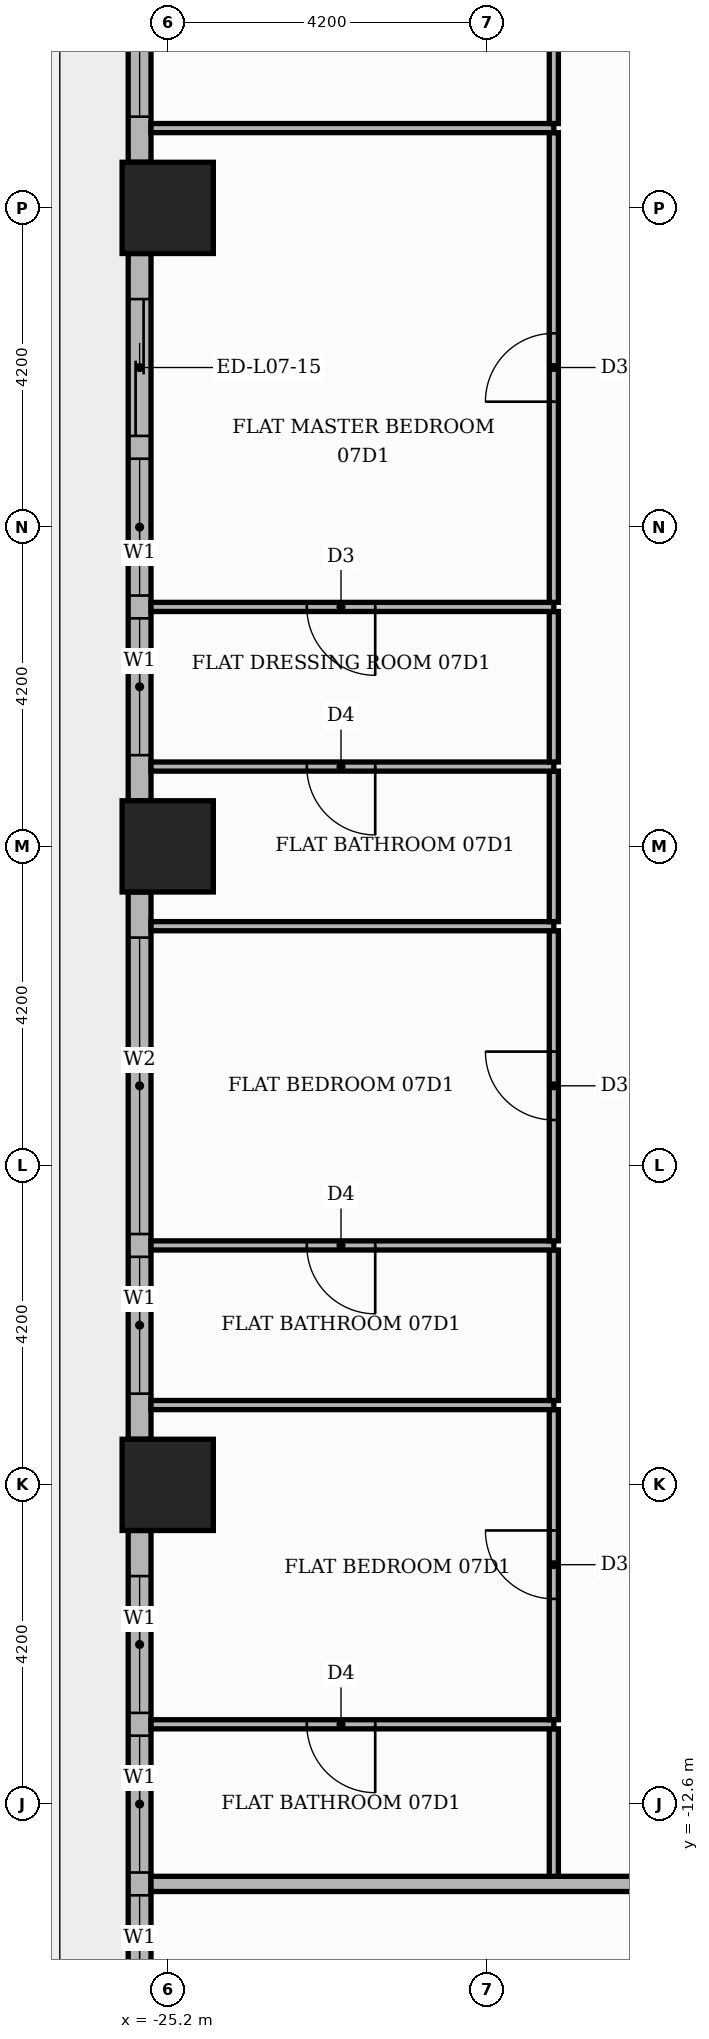
"""IFC4 building model, lengths in metres.
Left out: names, types, materials, properties, quantities, classifications, styles, units other than length and angle.
Written with IfcOpenShell. Run it as: python <this file> out.ifc"""

import sys

from ifc_helpers import new_model, si_unit, direction, frame, frame_2d, origin, origin_2d, place, context, subcontext, project, spatial, rectangle, extrude, element, fill, save


model = new_model("IFC4")
c1 = context("Model", 3, precision=1e-05, world=origin(), true_north=direction((0.0, 1.0)))
c2 = subcontext(c1, "Body", "Model", "MODEL_VIEW")
j1 = project(units=[si_unit("LENGTHUNIT", "METRE"), si_unit("PLANEANGLEUNIT", "RADIAN")], contexts=[c1])
p1 = place(None, origin())
s1 = spatial("IfcSite", under=j1, at=p1, CompositionType="ELEMENT")
p2 = place(p1, origin())
s2 = spatial("IfcBuilding", under=s1, at=p2, CompositionType="ELEMENT")
p3 = place(p2, frame((0.0, 0.0, 34.8)))
s3 = spatial("IfcBuildingStorey", under=s2, at=p3, CompositionType="ELEMENT", Elevation=34.8)
for number, where, z_axis, x_axis in (
    (1, (-25.2, 0.0, 0.0), (0.0, 0.0, 1.0), (1.0, 0.0, 0.0)),
    (2, (-25.2, -8.4, 0.0), (0.0, 0.0, 1.0), (1.0, 0.0, 0.0)),
    (3, (-25.2, 8.4, 0.0), (0.0, 0.0, 1.0), (1.0, 0.0, 0.0)),
):
    element("IfcColumn", number, at=place(p3, frame(where, z_axis=z_axis, x_axis=x_axis)), inside=s3, PredefinedType="COLUMN", context=c2, shape_type="SweptSolid", body=[
        extrude(rectangle(XDim=1.2, YDim=1.2, at=origin_2d()), origin(), (0.0, 0.0, 1.0), 3.9),
    ])
p4 = place(p3, frame((-25.57, 16.2, 0.0), z_axis=(0.0, 0.0, 1.0), x_axis=(0.0, -1.0, 0.0)))
e4 = element("IfcWall", 4, at=p4, inside=s3, PredefinedType="STANDARD", context=c2, shape_type="SweptSolid", body=[
    extrude(rectangle(XDim=7.2, YDim=0.3, at=frame_2d((3.6, 0.0))), origin(), (0.0, 0.0, 1.0), 3.48),
])
p5 = place(p4, frame((0.6, 0.0, 0.0)))
e5 = element("IfcOpeningElement", 5, at=p5, cuts=e4, PredefinedType="OPENING", context=c2, shape_type="SweptSolid", body=[
    extrude(rectangle(XDim=1.8, YDim=2.4, at=frame_2d((0.9, 1.2))), frame((0.0, 0.16, 0.0), z_axis=(0.0, -1.0, 0.0), x_axis=(1.0, 0.0, 0.0)), (0.0, 0.0, 1.0), 0.32),
])
p6 = place(p4, frame((2.7, 0.0, 0.9)))
e6 = element("IfcOpeningElement", 6, at=p6, cuts=e4, PredefinedType="OPENING", context=c2, shape_type="SweptSolid", body=[
    extrude(rectangle(XDim=3.9, YDim=2.1, at=frame_2d((1.95, 1.05))), frame((0.0, 0.16, 0.0), z_axis=(0.0, -1.0, 0.0), x_axis=(1.0, 0.0, 0.0)), (0.0, 0.0, 1.0), 0.32),
])
p7 = place(p3, frame((-25.57, 7.8, 0.0), z_axis=(0.0, 0.0, 1.0), x_axis=(0.0, -1.0, 0.0)))
e7 = element("IfcWall", 7, at=p7, inside=s3, PredefinedType="STANDARD", context=c2, shape_type="SweptSolid", body=[
    extrude(rectangle(XDim=7.2, YDim=0.3, at=frame_2d((3.6, 0.0))), origin(), (0.0, 0.0, 1.0), 3.48),
])
p8 = place(p7, frame((0.6, 0.0, 0.0)))
e8 = element("IfcOpeningElement", 8, at=p8, cuts=e7, PredefinedType="OPENING", context=c2, shape_type="SweptSolid", body=[
    extrude(rectangle(XDim=1.8, YDim=2.4, at=frame_2d((0.9, 1.2))), frame((0.0, 0.16, 0.0), z_axis=(0.0, -1.0, 0.0), x_axis=(1.0, 0.0, 0.0)), (0.0, 0.0, 1.0), 0.32),
])
p9 = place(p7, frame((2.7, 0.0, 0.9)))
e9 = element("IfcOpeningElement", 9, at=p9, cuts=e7, PredefinedType="OPENING", context=c2, shape_type="SweptSolid", body=[
    extrude(rectangle(XDim=1.8, YDim=2.1, at=frame_2d((0.9, 1.05))), frame((0.0, 0.16, 0.0), z_axis=(0.0, -1.0, 0.0), x_axis=(1.0, 0.0, 0.0)), (0.0, 0.0, 1.0), 0.32),
])
p10 = place(p7, frame((4.8, 0.0, 0.9)))
e10 = element("IfcOpeningElement", 10, at=p10, cuts=e7, PredefinedType="OPENING", context=c2, shape_type="SweptSolid", body=[
    extrude(rectangle(XDim=1.8, YDim=2.1, at=frame_2d((0.9, 1.05))), frame((0.0, 0.16, 0.0), z_axis=(0.0, -1.0, 0.0), x_axis=(1.0, 0.0, 0.0)), (0.0, 0.0, 1.0), 0.32),
])
p11 = place(p3, frame((-25.57, -0.6, 0.0), z_axis=(0.0, 0.0, 1.0), x_axis=(0.0, -1.0, 0.0)))
e11 = element("IfcWall", 11, at=p11, inside=s3, PredefinedType="STANDARD", context=c2, shape_type="SweptSolid", body=[
    extrude(rectangle(XDim=7.2, YDim=0.3, at=frame_2d((3.6, 0.0))), origin(), (0.0, 0.0, 1.0), 3.48),
])
p12 = place(p11, frame((0.6, 0.0, 0.9)))
e12 = element("IfcOpeningElement", 12, at=p12, cuts=e11, PredefinedType="OPENING", context=c2, shape_type="SweptSolid", body=[
    extrude(rectangle(XDim=3.9, YDim=2.1, at=frame_2d((1.95, 1.05))), frame((0.0, 0.16, 0.0), z_axis=(0.0, -1.0, 0.0), x_axis=(1.0, 0.0, 0.0)), (0.0, 0.0, 1.0), 0.32),
])
p13 = place(p11, frame((4.8, 0.0, 0.9)))
e13 = element("IfcOpeningElement", 13, at=p13, cuts=e11, PredefinedType="OPENING", context=c2, shape_type="SweptSolid", body=[
    extrude(rectangle(XDim=1.8, YDim=2.1, at=frame_2d((0.9, 1.05))), frame((0.0, 0.16, 0.0), z_axis=(0.0, -1.0, 0.0), x_axis=(1.0, 0.0, 0.0)), (0.0, 0.0, 1.0), 0.32),
])
p14 = place(p3, frame((-25.57, -9.0, 0.0), z_axis=(0.0, 0.0, 1.0), x_axis=(0.0, -1.0, 0.0)))
e14 = element("IfcWall", 14, at=p14, inside=s3, PredefinedType="STANDARD", context=c2, shape_type="SweptSolid", body=[
    extrude(rectangle(XDim=7.2, YDim=0.3, at=frame_2d((3.6, 0.0))), origin(), (0.0, 0.0, 1.0), 3.48),
])
p15 = place(p14, frame((0.6, 0.0, 0.9)))
e15 = element("IfcOpeningElement", 15, at=p15, cuts=e14, PredefinedType="OPENING", context=c2, shape_type="SweptSolid", body=[
    extrude(rectangle(XDim=1.8, YDim=2.1, at=frame_2d((0.9, 1.05))), frame((0.0, 0.16, 0.0), z_axis=(0.0, -1.0, 0.0), x_axis=(1.0, 0.0, 0.0)), (0.0, 0.0, 1.0), 0.32),
])
p16 = place(p14, frame((2.7, 0.0, 0.9)))
e16 = element("IfcOpeningElement", 16, at=p16, cuts=e14, PredefinedType="OPENING", context=c2, shape_type="SweptSolid", body=[
    extrude(rectangle(XDim=1.8, YDim=2.1, at=frame_2d((0.9, 1.05))), frame((0.0, 0.16, 0.0), z_axis=(0.0, -1.0, 0.0), x_axis=(1.0, 0.0, 0.0)), (0.0, 0.0, 1.0), 0.32),
])
p17 = place(p14, frame((4.8, 0.0, 0.9)))
e17 = element("IfcOpeningElement", 17, at=p17, cuts=e14, PredefinedType="OPENING", context=c2, shape_type="SweptSolid", body=[
    extrude(rectangle(XDim=1.8, YDim=2.1, at=frame_2d((0.9, 1.05))), frame((0.0, 0.16, 0.0), z_axis=(0.0, -1.0, 0.0), x_axis=(1.0, 0.0, 0.0)), (0.0, 0.0, 1.0), 0.32),
])
p18 = place(p3, frame((-25.42, -13.65, 0.0), z_axis=(0.0, 0.0, 1.0), x_axis=(1.0, 0.0, 0.0)))
e18 = element("IfcWall", 18, at=p18, inside=s3, PredefinedType="PARTITIONING", context=c2, shape_type="SweptSolid", body=[
    extrude(rectangle(XDim=39.07, YDim=0.2, at=frame_2d((19.535, 0.0))), origin(), (0.0, 0.0, 1.0), 3.48),
])
p19 = place(p18, frame((14.37, 0.0, 0.0)))
e19 = element("IfcOpeningElement", 19, at=p19, cuts=e18, PredefinedType="OPENING", context=c2, shape_type="SweptSolid", body=[
    extrude(rectangle(XDim=1.1, YDim=2.4, at=frame_2d((0.55, 1.2))), frame((0.0, 0.11, 0.0), z_axis=(0.0, -1.0, 0.0), x_axis=(1.0, 0.0, 0.0)), (0.0, 0.0, 1.0), 0.22),
])
p20 = place(p3, frame((-20.12, -13.55, 0.0), z_axis=(0.0, 0.0, 1.0), x_axis=(0.0, 1.0, 0.0)))
e20 = element("IfcWall", 20, at=p20, inside=s3, PredefinedType="PARTITIONING", context=c2, shape_type="SweptSolid", body=[
    extrude(rectangle(XDim=1.94, YDim=0.12, at=frame_2d((0.97, 0.0))), origin(), (0.0, 0.0, 1.0), 3.48),
])
p21 = place(p3, frame((-25.42, -11.55, 0.0), z_axis=(0.0, 0.0, 1.0), x_axis=(1.0, 0.0, 0.0)))
e21 = element("IfcWall", 21, at=p21, inside=s3, PredefinedType="PARTITIONING", context=c2, shape_type="SweptSolid", body=[
    extrude(rectangle(XDim=5.3, YDim=0.12, at=frame_2d((2.65, 0.0))), origin(), (0.0, 0.0, 1.0), 3.48),
])
p22 = place(p21, frame((2.05, 0.0, 0.0)))
e22 = element("IfcOpeningElement", 22, at=p22, cuts=e21, PredefinedType="OPENING", context=c2, shape_type="SweptSolid", body=[
    extrude(rectangle(XDim=0.9, YDim=2.1, at=frame_2d((0.45, 1.05))), frame((0.0, 0.07, 0.0), z_axis=(0.0, -1.0, 0.0), x_axis=(1.0, 0.0, 0.0)), (0.0, 0.0, 1.0), 0.14),
])
p23 = place(p3, frame((-20.12, -11.49, 0.0), z_axis=(0.0, 0.0, 1.0), x_axis=(0.0, 1.0, 0.0)))
e23 = element("IfcWall", 23, at=p23, inside=s3, PredefinedType="PARTITIONING", context=c2, shape_type="SweptSolid", body=[
    extrude(rectangle(XDim=4.08, YDim=0.12, at=frame_2d((2.04, 0.0))), origin(), (0.0, 0.0, 1.0), 3.48),
])
p24 = place(p23, frame((1.59, 0.0, 0.0)))
e24 = element("IfcOpeningElement", 24, at=p24, cuts=e23, PredefinedType="OPENING", context=c2, shape_type="SweptSolid", body=[
    extrude(rectangle(XDim=0.9, YDim=2.1, at=frame_2d((0.45, 1.05))), frame((0.0, 0.07, 0.0), z_axis=(0.0, -1.0, 0.0), x_axis=(1.0, 0.0, 0.0)), (0.0, 0.0, 1.0), 0.14),
])
p25 = place(p3, frame((-25.42, -7.35, 0.0), z_axis=(0.0, 0.0, 1.0), x_axis=(1.0, 0.0, 0.0)))
e25 = element("IfcWall", 25, at=p25, inside=s3, PredefinedType="PARTITIONING", context=c2, shape_type="SweptSolid", body=[
    extrude(rectangle(XDim=5.3, YDim=0.12, at=frame_2d((2.65, 0.0))), origin(), (0.0, 0.0, 1.0), 3.48),
])
p26 = place(p3, frame((-20.12, -7.29, 0.0), z_axis=(0.0, 0.0, 1.0), x_axis=(0.0, 1.0, 0.0)))
e26 = element("IfcWall", 26, at=p26, inside=s3, PredefinedType="PARTITIONING", context=c2, shape_type="SweptSolid", body=[
    extrude(rectangle(XDim=1.98, YDim=0.12, at=frame_2d((0.99, 0.0))), origin(), (0.0, 0.0, 1.0), 3.48),
])
p27 = place(p3, frame((-25.42, -5.25, 0.0), z_axis=(0.0, 0.0, 1.0), x_axis=(1.0, 0.0, 0.0)))
e27 = element("IfcWall", 27, at=p27, inside=s3, PredefinedType="PARTITIONING", context=c2, shape_type="SweptSolid", body=[
    extrude(rectangle(XDim=5.3, YDim=0.12, at=frame_2d((2.65, 0.0))), origin(), (0.0, 0.0, 1.0), 3.48),
])
p28 = place(p27, frame((2.05, 0.0, 0.0)))
e28 = element("IfcOpeningElement", 28, at=p28, cuts=e27, PredefinedType="OPENING", context=c2, shape_type="SweptSolid", body=[
    extrude(rectangle(XDim=0.9, YDim=2.1, at=frame_2d((0.45, 1.05))), frame((0.0, 0.07, 0.0), z_axis=(0.0, -1.0, 0.0), x_axis=(1.0, 0.0, 0.0)), (0.0, 0.0, 1.0), 0.14),
])
p29 = place(p3, frame((-20.12, -5.19, 0.0), z_axis=(0.0, 0.0, 1.0), x_axis=(0.0, 1.0, 0.0)))
e29 = element("IfcWall", 29, at=p29, inside=s3, PredefinedType="PARTITIONING", context=c2, shape_type="SweptSolid", body=[
    extrude(rectangle(XDim=4.08, YDim=0.12, at=frame_2d((2.04, 0.0))), origin(), (0.0, 0.0, 1.0), 3.48),
])
p30 = place(p29, frame((1.59, 0.0, 0.0)))
e30 = element("IfcOpeningElement", 30, at=p30, cuts=e29, PredefinedType="OPENING", context=c2, shape_type="SweptSolid", body=[
    extrude(rectangle(XDim=0.9, YDim=2.1, at=frame_2d((0.45, 1.05))), frame((0.0, 0.07, 0.0), z_axis=(0.0, -1.0, 0.0), x_axis=(1.0, 0.0, 0.0)), (0.0, 0.0, 1.0), 0.14),
])
p31 = place(p3, frame((-25.42, -1.05, 0.0), z_axis=(0.0, 0.0, 1.0), x_axis=(1.0, 0.0, 0.0)))
e31 = element("IfcWall", 31, at=p31, inside=s3, PredefinedType="PARTITIONING", context=c2, shape_type="SweptSolid", body=[
    extrude(rectangle(XDim=5.3, YDim=0.12, at=frame_2d((2.65, 0.0))), origin(), (0.0, 0.0, 1.0), 3.48),
])
p32 = place(p3, frame((-20.12, -0.99, 0.0), z_axis=(0.0, 0.0, 1.0), x_axis=(0.0, 1.0, 0.0)))
e32 = element("IfcWall", 32, at=p32, inside=s3, PredefinedType="PARTITIONING", context=c2, shape_type="SweptSolid", body=[
    extrude(rectangle(XDim=1.98, YDim=0.12, at=frame_2d((0.99, 0.0))), origin(), (0.0, 0.0, 1.0), 3.48),
])
p33 = place(p3, frame((-25.42, 1.05, 0.0), z_axis=(0.0, 0.0, 1.0), x_axis=(1.0, 0.0, 0.0)))
e33 = element("IfcWall", 33, at=p33, inside=s3, PredefinedType="PARTITIONING", context=c2, shape_type="SweptSolid", body=[
    extrude(rectangle(XDim=5.3, YDim=0.12, at=frame_2d((2.65, 0.0))), origin(), (0.0, 0.0, 1.0), 3.48),
])
p34 = place(p33, frame((2.05, 0.0, 0.0)))
e34 = element("IfcOpeningElement", 34, at=p34, cuts=e33, PredefinedType="OPENING", context=c2, shape_type="SweptSolid", body=[
    extrude(rectangle(XDim=0.9, YDim=2.1, at=frame_2d((0.45, 1.05))), frame((0.0, 0.07, 0.0), z_axis=(0.0, -1.0, 0.0), x_axis=(1.0, 0.0, 0.0)), (0.0, 0.0, 1.0), 0.14),
])
p35 = place(p3, frame((-20.12, 1.11, 0.0), z_axis=(0.0, 0.0, 1.0), x_axis=(0.0, 1.0, 0.0)))
e35 = element("IfcWall", 35, at=p35, inside=s3, PredefinedType="PARTITIONING", context=c2, shape_type="SweptSolid", body=[
    extrude(rectangle(XDim=1.98, YDim=0.12, at=frame_2d((0.99, 0.0))), origin(), (0.0, 0.0, 1.0), 3.48),
])
p36 = place(p3, frame((-25.42, 3.15, 0.0), z_axis=(0.0, 0.0, 1.0), x_axis=(1.0, 0.0, 0.0)))
e36 = element("IfcWall", 36, at=p36, inside=s3, PredefinedType="PARTITIONING", context=c2, shape_type="SweptSolid", body=[
    extrude(rectangle(XDim=5.3, YDim=0.12, at=frame_2d((2.65, 0.0))), origin(), (0.0, 0.0, 1.0), 3.48),
])
p37 = place(p36, frame((2.05, 0.0, 0.0)))
e37 = element("IfcOpeningElement", 37, at=p37, cuts=e36, PredefinedType="OPENING", context=c2, shape_type="SweptSolid", body=[
    extrude(rectangle(XDim=0.9, YDim=2.1, at=frame_2d((0.45, 1.05))), frame((0.0, 0.07, 0.0), z_axis=(0.0, -1.0, 0.0), x_axis=(1.0, 0.0, 0.0)), (0.0, 0.0, 1.0), 0.14),
])
p38 = place(p3, frame((-20.12, 3.21, 0.0), z_axis=(0.0, 0.0, 1.0), x_axis=(0.0, 1.0, 0.0)))
e38 = element("IfcWall", 38, at=p38, inside=s3, PredefinedType="PARTITIONING", context=c2, shape_type="SweptSolid", body=[
    extrude(rectangle(XDim=6.18, YDim=0.12, at=frame_2d((3.09, 0.0))), origin(), (0.0, 0.0, 1.0), 3.48),
])
p39 = place(p38, frame((2.64, 0.0, 0.0)))
e39 = element("IfcOpeningElement", 39, at=p39, cuts=e38, PredefinedType="OPENING", context=c2, shape_type="SweptSolid", body=[
    extrude(rectangle(XDim=0.9, YDim=2.1, at=frame_2d((0.45, 1.05))), frame((0.0, 0.07, 0.0), z_axis=(0.0, -1.0, 0.0), x_axis=(1.0, 0.0, 0.0)), (0.0, 0.0, 1.0), 0.14),
])
p40 = place(p3, frame((-25.42, 9.45, 0.0), z_axis=(0.0, 0.0, 1.0), x_axis=(1.0, 0.0, 0.0)))
e40 = element("IfcWall", 40, at=p40, inside=s3, PredefinedType="PARTITIONING", context=c2, shape_type="SweptSolid", body=[
    extrude(rectangle(XDim=5.3, YDim=0.12, at=frame_2d((2.65, 0.0))), origin(), (0.0, 0.0, 1.0), 3.48),
])
p41 = place(p3, frame((-20.12, 9.51, 0.0), z_axis=(0.0, 0.0, 1.0), x_axis=(0.0, 1.0, 0.0)))
e41 = element("IfcWall", 41, at=p41, inside=s3, PredefinedType="PARTITIONING", context=c2, shape_type="SweptSolid", body=[
    extrude(rectangle(XDim=4.08, YDim=0.12, at=frame_2d((2.04, 0.0))), origin(), (0.0, 0.0, 1.0), 3.48),
])
p42 = place(p41, frame((1.59, 0.0, 0.0)))
e42 = element("IfcOpeningElement", 42, at=p42, cuts=e41, PredefinedType="OPENING", context=c2, shape_type="SweptSolid", body=[
    extrude(rectangle(XDim=0.9, YDim=2.1, at=frame_2d((0.45, 1.05))), frame((0.0, 0.07, 0.0), z_axis=(0.0, -1.0, 0.0), x_axis=(1.0, 0.0, 0.0)), (0.0, 0.0, 1.0), 0.14),
])
p43 = place(p6, origin())
e43 = element("IfcWindow", 43, at=p43, inside=s3, PartitioningType="SINGLE_PANEL", PredefinedType="WINDOW", context=c2, shape_type="SweptSolid", body=[
    extrude(rectangle(XDim=3.9, YDim=2.1, at=frame_2d((1.95, 1.05))), frame((0.0, 0.03, 0.0), z_axis=(0.0, -1.0, 0.0), x_axis=(1.0, 0.0, 0.0)), (0.0, 0.0, 1.0), 0.06),
])
fill(e6, e43)
p44 = place(p8, origin())
e44 = element("IfcDoor", 44, at=p44, inside=s3, OperationType="SLIDING_TO_LEFT", PredefinedType="DOOR", context=c2, shape_type="SweptSolid", body=[
    extrude(rectangle(XDim=1.8, YDim=2.4, at=frame_2d((0.9, 1.2))), frame((0.0, 0.025, 0.0), z_axis=(0.0, -1.0, 0.0), x_axis=(1.0, 0.0, 0.0)), (0.0, 0.0, 1.0), 0.05),
])
fill(e8, e44)
p45 = place(p9, origin())
e45 = element("IfcWindow", 45, at=p45, inside=s3, PartitioningType="SINGLE_PANEL", PredefinedType="WINDOW", context=c2, shape_type="SweptSolid", body=[
    extrude(rectangle(XDim=1.8, YDim=2.1, at=frame_2d((0.9, 1.05))), frame((0.0, 0.03, 0.0), z_axis=(0.0, -1.0, 0.0), x_axis=(1.0, 0.0, 0.0)), (0.0, 0.0, 1.0), 0.06),
])
fill(e9, e45)
p46 = place(p10, origin())
e46 = element("IfcWindow", 46, at=p46, inside=s3, PartitioningType="SINGLE_PANEL", PredefinedType="WINDOW", context=c2, shape_type="SweptSolid", body=[
    extrude(rectangle(XDim=1.8, YDim=2.1, at=frame_2d((0.9, 1.05))), frame((0.0, 0.03, 0.0), z_axis=(0.0, -1.0, 0.0), x_axis=(1.0, 0.0, 0.0)), (0.0, 0.0, 1.0), 0.06),
])
fill(e10, e46)
p47 = place(p12, origin())
e47 = element("IfcWindow", 47, at=p47, inside=s3, PartitioningType="SINGLE_PANEL", PredefinedType="WINDOW", context=c2, shape_type="SweptSolid", body=[
    extrude(rectangle(XDim=3.9, YDim=2.1, at=frame_2d((1.95, 1.05))), frame((0.0, 0.03, 0.0), z_axis=(0.0, -1.0, 0.0), x_axis=(1.0, 0.0, 0.0)), (0.0, 0.0, 1.0), 0.06),
])
fill(e12, e47)
p48 = place(p13, origin())
e48 = element("IfcWindow", 48, at=p48, inside=s3, PartitioningType="SINGLE_PANEL", PredefinedType="WINDOW", context=c2, shape_type="SweptSolid", body=[
    extrude(rectangle(XDim=1.8, YDim=2.1, at=frame_2d((0.9, 1.05))), frame((0.0, 0.03, 0.0), z_axis=(0.0, -1.0, 0.0), x_axis=(1.0, 0.0, 0.0)), (0.0, 0.0, 1.0), 0.06),
])
fill(e13, e48)
p49 = place(p15, origin())
e49 = element("IfcWindow", 49, at=p49, inside=s3, PartitioningType="SINGLE_PANEL", PredefinedType="WINDOW", context=c2, shape_type="SweptSolid", body=[
    extrude(rectangle(XDim=1.8, YDim=2.1, at=frame_2d((0.9, 1.05))), frame((0.0, 0.03, 0.0), z_axis=(0.0, -1.0, 0.0), x_axis=(1.0, 0.0, 0.0)), (0.0, 0.0, 1.0), 0.06),
])
fill(e15, e49)
p50 = place(p16, origin())
e50 = element("IfcWindow", 50, at=p50, inside=s3, PartitioningType="SINGLE_PANEL", PredefinedType="WINDOW", context=c2, shape_type="SweptSolid", body=[
    extrude(rectangle(XDim=1.8, YDim=2.1, at=frame_2d((0.9, 1.05))), frame((0.0, 0.03, 0.0), z_axis=(0.0, -1.0, 0.0), x_axis=(1.0, 0.0, 0.0)), (0.0, 0.0, 1.0), 0.06),
])
fill(e16, e50)
p51 = place(p17, origin())
e51 = element("IfcWindow", 51, at=p51, inside=s3, PartitioningType="SINGLE_PANEL", PredefinedType="WINDOW", context=c2, shape_type="SweptSolid", body=[
    extrude(rectangle(XDim=1.8, YDim=2.1, at=frame_2d((0.9, 1.05))), frame((0.0, 0.03, 0.0), z_axis=(0.0, -1.0, 0.0), x_axis=(1.0, 0.0, 0.0)), (0.0, 0.0, 1.0), 0.06),
])
fill(e17, e51)
p52 = place(p39, origin())
e52 = element("IfcDoor", 52, at=p52, inside=s3, OperationType="SINGLE_SWING_LEFT", PredefinedType="DOOR", context=c2, shape_type="SweptSolid", body=[
    extrude(rectangle(XDim=0.9, YDim=2.1, at=frame_2d((0.45, 1.05))), frame((0.0, 0.025, 0.0), z_axis=(0.0, -1.0, 0.0), x_axis=(1.0, 0.0, 0.0)), (0.0, 0.0, 1.0), 0.05),
])
fill(e39, e52)
p53 = place(p37, frame((0.9, 0.0, 0.0), z_axis=(0.0, 0.0, 1.0), x_axis=(-1.0, 0.0, 0.0)))
e53 = element("IfcDoor", 53, at=p53, inside=s3, OperationType="SINGLE_SWING_RIGHT", PredefinedType="DOOR", context=c2, shape_type="SweptSolid", body=[
    extrude(rectangle(XDim=0.9, YDim=2.1, at=frame_2d((0.45, 1.05))), frame((0.0, 0.025, 0.0), z_axis=(0.0, -1.0, 0.0), x_axis=(1.0, 0.0, 0.0)), (0.0, 0.0, 1.0), 0.05),
])
fill(e37, e53)
p54 = place(p34, frame((0.9, 0.0, 0.0), z_axis=(0.0, 0.0, 1.0), x_axis=(-1.0, 0.0, 0.0)))
e54 = element("IfcDoor", 54, at=p54, inside=s3, OperationType="SINGLE_SWING_RIGHT", PredefinedType="DOOR", context=c2, shape_type="SweptSolid", body=[
    extrude(rectangle(XDim=0.9, YDim=2.1, at=frame_2d((0.45, 1.05))), frame((0.0, 0.025, 0.0), z_axis=(0.0, -1.0, 0.0), x_axis=(1.0, 0.0, 0.0)), (0.0, 0.0, 1.0), 0.05),
])
fill(e34, e54)
p55 = place(p30, origin())
e55 = element("IfcDoor", 55, at=p55, inside=s3, OperationType="SINGLE_SWING_RIGHT", PredefinedType="DOOR", context=c2, shape_type="SweptSolid", body=[
    extrude(rectangle(XDim=0.9, YDim=2.1, at=frame_2d((0.45, 1.05))), frame((0.0, 0.025, 0.0), z_axis=(0.0, -1.0, 0.0), x_axis=(1.0, 0.0, 0.0)), (0.0, 0.0, 1.0), 0.05),
])
fill(e30, e55)
p56 = place(p28, frame((0.9, 0.0, 0.0), z_axis=(0.0, 0.0, 1.0), x_axis=(-1.0, 0.0, 0.0)))
e56 = element("IfcDoor", 56, at=p56, inside=s3, OperationType="SINGLE_SWING_RIGHT", PredefinedType="DOOR", context=c2, shape_type="SweptSolid", body=[
    extrude(rectangle(XDim=0.9, YDim=2.1, at=frame_2d((0.45, 1.05))), frame((0.0, 0.025, 0.0), z_axis=(0.0, -1.0, 0.0), x_axis=(1.0, 0.0, 0.0)), (0.0, 0.0, 1.0), 0.05),
])
fill(e28, e56)
p57 = place(p24, origin())
e57 = element("IfcDoor", 57, at=p57, inside=s3, OperationType="SINGLE_SWING_RIGHT", PredefinedType="DOOR", context=c2, shape_type="SweptSolid", body=[
    extrude(rectangle(XDim=0.9, YDim=2.1, at=frame_2d((0.45, 1.05))), frame((0.0, 0.025, 0.0), z_axis=(0.0, -1.0, 0.0), x_axis=(1.0, 0.0, 0.0)), (0.0, 0.0, 1.0), 0.05),
])
fill(e24, e57)
p58 = place(p22, frame((0.9, 0.0, 0.0), z_axis=(0.0, 0.0, 1.0), x_axis=(-1.0, 0.0, 0.0)))
e58 = element("IfcDoor", 58, at=p58, inside=s3, OperationType="SINGLE_SWING_RIGHT", PredefinedType="DOOR", context=c2, shape_type="SweptSolid", body=[
    extrude(rectangle(XDim=0.9, YDim=2.1, at=frame_2d((0.45, 1.05))), frame((0.0, 0.025, 0.0), z_axis=(0.0, -1.0, 0.0), x_axis=(1.0, 0.0, 0.0)), (0.0, 0.0, 1.0), 0.05),
])
fill(e22, e58)
save(model, sys.argv[1])
